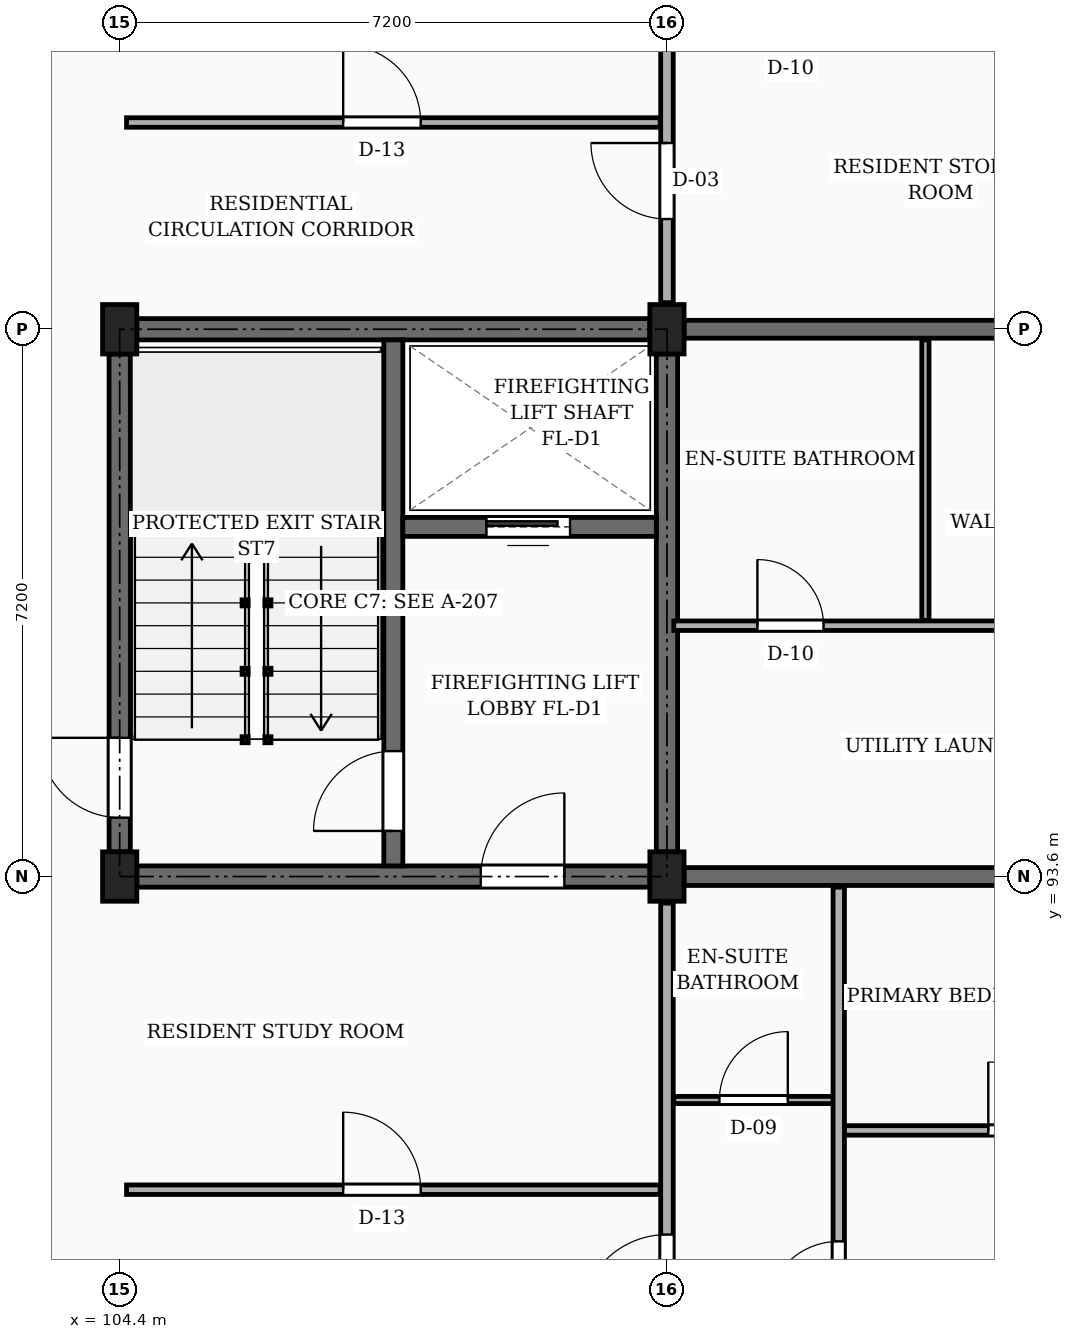
"""IFC4 building model, lengths in metres.
Left out: names, types, materials, properties, quantities, classifications, styles, units other than length and angle.
Written with IfcOpenShell. Run it as: python <this file> out.ifc"""

import sys

from ifc_helpers import new_model, si_unit, direction, frame, frame_2d, origin, origin_2d, place, context, subcontext, project, spatial, rectangle, extrude, element, fill, save


model = new_model("IFC4")
c1 = context("Model", 3, precision=1e-05, world=origin(), true_north=direction((0.0, 1.0)))
c2 = subcontext(c1, "Body", "Model", "MODEL_VIEW")
j1 = project(units=[si_unit("LENGTHUNIT", "METRE"), si_unit("PLANEANGLEUNIT", "RADIAN")], contexts=[c1])
p1 = place(None, origin())
s1 = spatial("IfcSite", under=j1, at=p1, CompositionType="ELEMENT")
p2 = place(p1, origin())
s2 = spatial("IfcBuilding", under=s1, at=p2, CompositionType="ELEMENT")
p3 = place(p2, frame((0.0, 0.0, 20.25)))
s3 = spatial("IfcBuildingStorey", under=s2, at=p3, CompositionType="ELEMENT", Elevation=20.25)
for number, where, z_axis, x_axis in (
    (1, (104.4, 93.6, 0.0), (0.0, 0.0, 1.0), (1.0, 0.0, 0.0)),
    (2, (104.4, 100.8, 0.0), (0.0, 0.0, 1.0), (1.0, 0.0, 0.0)),
    (3, (111.6, 93.6, 0.0), (0.0, 0.0, 1.0), (1.0, 0.0, 0.0)),
    (4, (111.6, 100.8, 0.0), (0.0, 0.0, 1.0), (1.0, 0.0, 0.0)),
):
    element("IfcColumn", number, at=place(p3, frame(where, z_axis=z_axis, x_axis=x_axis)), inside=s3, PredefinedType="COLUMN", context=c2, shape_type="SweptSolid", body=[
        extrude(rectangle(XDim=0.45, YDim=0.65, at=origin_2d()), origin(), (0.0, 0.0, 1.0), 3.15),
    ])
p4 = place(p3, frame((111.825, 93.6, 0.0), z_axis=(0.0, 0.0, 1.0), x_axis=(1.0, 0.0, 0.0)))
e5 = element("IfcWall", 5, at=p4, inside=s3, PredefinedType="SOLIDWALL", context=c2, shape_type="SweptSolid", body=[
    extrude(rectangle(XDim=6.7, YDim=0.235, at=frame_2d((3.35, 0.0))), origin(), (0.0, 0.0, 1.0), 2.19),
])
p5 = place(p4, frame((4.35, 0.0, 0.0)))
e6 = element("IfcOpeningElement", 6, at=p5, cuts=e5, PredefinedType="OPENING", context=c2, shape_type="SweptSolid", body=[
    extrude(rectangle(XDim=0.98, YDim=2.12, at=frame_2d((0.49, 1.06))), frame((0.0, 0.127, 0.0), z_axis=(0.0, -1.0, 0.0), x_axis=(1.0, 0.0, 0.0)), (0.0, 0.0, 1.0), 0.255),
])
p6 = place(p3, frame((111.825, 100.8, 0.0), z_axis=(0.0, 0.0, 1.0), x_axis=(1.0, 0.0, 0.0)))
e7 = element("IfcWall", 7, at=p6, inside=s3, PredefinedType="SOLIDWALL", context=c2, shape_type="SweptSolid", body=[
    extrude(rectangle(XDim=6.7, YDim=0.235, at=frame_2d((3.35, 0.0))), origin(), (0.0, 0.0, 1.0), 2.19),
])
p7 = place(p3, frame((104.4, 93.925, 0.0), z_axis=(0.0, 0.0, 1.0), x_axis=(0.0, 1.0, 0.0)))
e8 = element("IfcWall", 8, at=p7, inside=s3, PredefinedType="SHEAR", context=c2, shape_type="SweptSolid", body=[
    extrude(rectangle(XDim=6.55, YDim=0.28, at=frame_2d((3.275, 0.0))), origin(), (0.0, 0.0, 1.0), 2.89),
])
p8 = place(p7, frame((0.45, 0.0, 0.0)))
e9 = element("IfcOpeningElement", 9, at=p8, cuts=e8, PredefinedType="OPENING", context=c2, shape_type="SweptSolid", body=[
    extrude(rectangle(XDim=1.05, YDim=2.15, at=frame_2d((0.525, 1.075))), frame((0.0, 0.15, 0.0), z_axis=(0.0, -1.0, 0.0), x_axis=(1.0, 0.0, 0.0)), (0.0, 0.0, 1.0), 0.3),
])
p9 = place(p3, frame((104.625, 100.8, 0.0), z_axis=(0.0, 0.0, 1.0), x_axis=(1.0, 0.0, 0.0)))
e10 = element("IfcWall", 10, at=p9, inside=s3, PredefinedType="SHEAR", context=c2, shape_type="SweptSolid", body=[
    extrude(rectangle(XDim=6.75, YDim=0.28, at=frame_2d((3.375, 0.0))), origin(), (0.0, 0.0, 1.0), 2.89),
])
p10 = place(p3, frame((111.6, 93.925, 0.0), z_axis=(0.0, 0.0, 1.0), x_axis=(0.0, 1.0, 0.0)))
e11 = element("IfcWall", 11, at=p10, inside=s3, PredefinedType="SHEAR", context=c2, shape_type="SweptSolid", body=[
    extrude(rectangle(XDim=6.55, YDim=0.28, at=frame_2d((3.275, 0.0))), origin(), (0.0, 0.0, 1.0), 2.89),
])
p11 = place(p3, frame((104.625, 93.6, 0.0), z_axis=(0.0, 0.0, 1.0), x_axis=(1.0, 0.0, 0.0)))
e12 = element("IfcWall", 12, at=p11, inside=s3, PredefinedType="SHEAR", context=c2, shape_type="SweptSolid", body=[
    extrude(rectangle(XDim=6.75, YDim=0.28, at=frame_2d((3.375, 0.0))), origin(), (0.0, 0.0, 1.0), 2.89),
])
p12 = place(p11, frame((4.525, 0.0, 0.0)))
e13 = element("IfcOpeningElement", 13, at=p12, cuts=e12, PredefinedType="OPENING", context=c2, shape_type="SweptSolid", body=[
    extrude(rectangle(XDim=1.1, YDim=2.15, at=frame_2d((0.55, 1.075))), frame((0.0, 0.15, 0.0), z_axis=(0.0, -1.0, 0.0), x_axis=(1.0, 0.0, 0.0)), (0.0, 0.0, 1.0), 0.3),
])
p13 = place(p3, frame((108.0, 93.74, 0.0), z_axis=(0.0, 0.0, 1.0), x_axis=(0.0, 1.0, 0.0)))
e14 = element("IfcWall", 14, at=p13, inside=s3, PredefinedType="SHEAR", context=c2, shape_type="SweptSolid", body=[
    extrude(rectangle(XDim=6.92, YDim=0.25, at=frame_2d((3.46, 0.0))), origin(), (0.0, 0.0, 1.0), 2.89),
])
p14 = place(p13, frame((0.46, 0.0, 0.0)))
e15 = element("IfcOpeningElement", 15, at=p14, cuts=e14, PredefinedType="OPENING", context=c2, shape_type="SweptSolid", body=[
    extrude(rectangle(XDim=1.05, YDim=2.15, at=frame_2d((0.525, 1.075))), frame((0.0, 0.135, 0.0), z_axis=(0.0, -1.0, 0.0), x_axis=(1.0, 0.0, 0.0)), (0.0, 0.0, 1.0), 0.27),
])
p15 = place(p3, frame((108.125, 98.2, 0.0), z_axis=(0.0, 0.0, 1.0), x_axis=(1.0, 0.0, 0.0)))
e16 = element("IfcWall", 16, at=p15, inside=s3, PredefinedType="SHEAR", context=c2, shape_type="SweptSolid", body=[
    extrude(rectangle(XDim=3.335, YDim=0.25, at=frame_2d((1.667, 0.0))), origin(), (0.0, 0.0, 1.0), 2.89),
])
p16 = place(p15, frame((1.1, 0.0, 0.0)))
e17 = element("IfcOpeningElement", 17, at=p16, cuts=e16, PredefinedType="OPENING", context=c2, shape_type="SweptSolid", body=[
    extrude(rectangle(XDim=1.1, YDim=2.2, at=frame_2d((0.55, 1.1))), frame((0.0, 0.135, 0.0), z_axis=(0.0, -1.0, 0.0), x_axis=(1.0, 0.0, 0.0)), (0.0, 0.0, 1.0), 0.27),
])
p17 = place(p3, frame((111.6, 86.75, 0.0), z_axis=(0.0, 0.0, 1.0), x_axis=(0.0, 1.0, 0.0)))
e18 = element("IfcWall", 18, at=p17, inside=s3, PredefinedType="PARTITIONING", context=c2, shape_type="SweptSolid", body=[
    extrude(rectangle(XDim=6.5, YDim=0.165, at=frame_2d((3.25, 0.0))), origin(), (0.0, 0.0, 1.0), 2.325),
])
p18 = place(p17, frame((1.0, 0.0, 0.0)))
e19 = element("IfcOpeningElement", 19, at=p18, cuts=e18, PredefinedType="OPENING", context=c2, shape_type="SweptSolid", body=[
    extrude(rectangle(XDim=1.14, YDim=2.18, at=frame_2d((0.57, 1.09))), frame((0.0, 0.093, 0.0), z_axis=(0.0, -1.0, 0.0), x_axis=(1.0, 0.0, 0.0)), (0.0, 0.0, 1.0), 0.185),
])
p19 = place(p3, frame((111.6, 101.15, 0.0), z_axis=(0.0, 0.0, 1.0), x_axis=(0.0, 1.0, 0.0)))
e20 = element("IfcWall", 20, at=p19, inside=s3, PredefinedType="PARTITIONING", context=c2, shape_type="SweptSolid", body=[
    extrude(rectangle(XDim=6.5, YDim=0.165, at=frame_2d((3.25, 0.0))), origin(), (0.0, 0.0, 1.0), 2.325),
])
p20 = place(p19, frame((1.1, 0.0, 0.0)))
e21 = element("IfcOpeningElement", 21, at=p20, cuts=e20, PredefinedType="OPENING", context=c2, shape_type="SweptSolid", body=[
    extrude(rectangle(XDim=1.0, YDim=2.15, at=frame_2d((0.5, 1.075))), frame((0.0, 0.093, 0.0), z_axis=(0.0, -1.0, 0.0), x_axis=(1.0, 0.0, 0.0)), (0.0, 0.0, 1.0), 0.185),
])
p21 = place(p3, frame((104.49, 89.48, 0.0), z_axis=(0.0, 0.0, 1.0), x_axis=(1.0, 0.0, 0.0)))
e22 = element("IfcWall", 22, at=p21, inside=s3, PredefinedType="PARTITIONING", context=c2, shape_type="SweptSolid", body=[
    extrude(rectangle(XDim=7.02, YDim=0.125, at=frame_2d((3.51, 0.0))), origin(), (0.0, 0.0, 1.0), 2.325),
])
p22 = place(p21, frame((2.85, 0.0, 0.0)))
e23 = element("IfcOpeningElement", 23, at=p22, cuts=e22, PredefinedType="OPENING", context=c2, shape_type="SweptSolid", body=[
    extrude(rectangle(XDim=1.02, YDim=2.15, at=frame_2d((0.51, 1.075))), frame((0.0, 0.073, 0.0), z_axis=(0.0, -1.0, 0.0), x_axis=(1.0, 0.0, 0.0)), (0.0, 0.0, 1.0), 0.145),
])
p23 = place(p3, frame((113.93, 90.26, 0.0), z_axis=(0.0, 0.0, 1.0), x_axis=(1.0, 0.0, 0.0)))
e24 = element("IfcWall", 24, at=p23, inside=s3, PredefinedType="PARTITIONING", context=c2, shape_type="SweptSolid", body=[
    extrude(rectangle(XDim=4.695, YDim=0.125, at=frame_2d((2.348, 0.0))), origin(), (0.0, 0.0, 1.0), 2.325),
])
p24 = place(p23, frame((1.897, 0.0, 0.0)))
e25 = element("IfcOpeningElement", 25, at=p24, cuts=e24, PredefinedType="OPENING", context=c2, shape_type="SweptSolid", body=[
    extrude(rectangle(XDim=0.9, YDim=2.1, at=frame_2d((0.45, 1.05))), frame((0.0, 0.073, 0.0), z_axis=(0.0, -1.0, 0.0), x_axis=(1.0, 0.0, 0.0)), (0.0, 0.0, 1.0), 0.145),
])
p25 = place(p3, frame((111.69, 90.66, 0.0), z_axis=(0.0, 0.0, 1.0), x_axis=(1.0, 0.0, 0.0)))
e26 = element("IfcWall", 26, at=p25, inside=s3, PredefinedType="PARTITIONING", context=c2, shape_type="SweptSolid", body=[
    extrude(rectangle(XDim=2.1, YDim=0.095, at=frame_2d((1.05, 0.0))), origin(), (0.0, 0.0, 1.0), 2.325),
])
p26 = place(p25, frame((0.6, 0.0, 0.0)))
e27 = element("IfcOpeningElement", 27, at=p26, cuts=e26, PredefinedType="OPENING", context=c2, shape_type="SweptSolid", body=[
    extrude(rectangle(XDim=0.9, YDim=2.05, at=frame_2d((0.45, 1.025))), frame((0.0, 0.058, 0.0), z_axis=(0.0, -1.0, 0.0), x_axis=(1.0, 0.0, 0.0)), (0.0, 0.0, 1.0), 0.115),
])
p27 = place(p3, frame((113.86, 86.575, 0.0), z_axis=(0.0, 0.0, 1.0), x_axis=(0.0, 1.0, 0.0)))
e28 = element("IfcWall", 28, at=p27, inside=s3, PredefinedType="PARTITIONING", context=c2, shape_type="SweptSolid", body=[
    extrude(rectangle(XDim=6.885, YDim=0.15, at=frame_2d((3.442, 0.0))), origin(), (0.0, 0.0, 1.0), 2.325),
])
p28 = place(p27, frame((1.275, 0.0, 0.0)))
e29 = element("IfcOpeningElement", 29, at=p28, cuts=e28, PredefinedType="OPENING", context=c2, shape_type="SweptSolid", body=[
    extrude(rectangle(XDim=0.95, YDim=2.1, at=frame_2d((0.475, 1.05))), frame((0.0, 0.085, 0.0), z_axis=(0.0, -1.0, 0.0), x_axis=(1.0, 0.0, 0.0)), (0.0, 0.0, 1.0), 0.17),
])
p29 = place(p3, frame((111.69, 96.9, 0.0), z_axis=(0.0, 0.0, 1.0), x_axis=(1.0, 0.0, 0.0)))
e30 = element("IfcWall", 30, at=p29, inside=s3, PredefinedType="PARTITIONING", context=c2, shape_type="SweptSolid", body=[
    extrude(rectangle(XDim=6.935, YDim=0.125, at=frame_2d((3.468, 0.0))), origin(), (0.0, 0.0, 1.0), 2.325),
])
p30 = place(p29, frame((1.1, 0.0, 0.0)))
e31 = element("IfcOpeningElement", 31, at=p30, cuts=e30, PredefinedType="OPENING", context=c2, shape_type="SweptSolid", body=[
    extrude(rectangle(XDim=0.87, YDim=2.05, at=frame_2d((0.435, 1.025))), frame((0.0, 0.073, 0.0), z_axis=(0.0, -1.0, 0.0), x_axis=(1.0, 0.0, 0.0)), (0.0, 0.0, 1.0), 0.145),
])
p31 = place(p29, frame((4.5, 0.0, 0.0)))
e32 = element("IfcOpeningElement", 32, at=p31, cuts=e30, PredefinedType="OPENING", context=c2, shape_type="SweptSolid", body=[
    extrude(rectangle(XDim=0.88, YDim=2.08, at=frame_2d((0.44, 1.04))), frame((0.0, 0.073, 0.0), z_axis=(0.0, -1.0, 0.0), x_axis=(1.0, 0.0, 0.0)), (0.0, 0.0, 1.0), 0.145),
])
p32 = place(p3, frame((115.0, 96.97, 0.0), z_axis=(0.0, 0.0, 1.0), x_axis=(0.0, 1.0, 0.0)))
e33 = element("IfcWall", 33, at=p32, inside=s3, PredefinedType="PARTITIONING", context=c2, shape_type="SweptSolid", body=[
    extrude(rectangle(XDim=3.69, YDim=0.095, at=frame_2d((1.845, 0.0))), origin(), (0.0, 0.0, 1.0), 2.325),
])
p33 = place(p3, frame((104.49, 103.52, 0.0), z_axis=(0.0, 0.0, 1.0), x_axis=(1.0, 0.0, 0.0)))
e34 = element("IfcWall", 34, at=p33, inside=s3, PredefinedType="PARTITIONING", context=c2, shape_type="SweptSolid", body=[
    extrude(rectangle(XDim=7.02, YDim=0.125, at=frame_2d((3.51, 0.0))), origin(), (0.0, 0.0, 1.0), 2.325),
])
p34 = place(p33, frame((2.85, 0.0, 0.0)))
e35 = element("IfcOpeningElement", 35, at=p34, cuts=e34, PredefinedType="OPENING", context=c2, shape_type="SweptSolid", body=[
    extrude(rectangle(XDim=1.02, YDim=2.15, at=frame_2d((0.51, 1.075))), frame((0.0, 0.073, 0.0), z_axis=(0.0, -1.0, 0.0), x_axis=(1.0, 0.0, 0.0)), (0.0, 0.0, 1.0), 0.145),
])
p35 = place(p8, origin())
e36 = element("IfcDoor", 36, at=p35, inside=s3, OperationType="SINGLE_SWING_RIGHT", PredefinedType="DOOR", context=c2, shape_type="SweptSolid", body=[
    extrude(rectangle(XDim=1.05, YDim=2.15, at=frame_2d((0.525, 1.075))), frame((0.0, 0.025, 0.0), z_axis=(0.0, -1.0, 0.0), x_axis=(1.0, 0.0, 0.0)), (0.0, 0.0, 1.0), 0.05),
])
fill(e9, e36)
p36 = place(p12, frame((1.1, 0.0, 0.0), z_axis=(0.0, 0.0, 1.0), x_axis=(-1.0, 0.0, 0.0)))
e37 = element("IfcDoor", 37, at=p36, inside=s3, OperationType="SINGLE_SWING_RIGHT", PredefinedType="DOOR", context=c2, shape_type="SweptSolid", body=[
    extrude(rectangle(XDim=1.1, YDim=2.15, at=frame_2d((0.55, 1.075))), frame((0.0, 0.025, 0.0), z_axis=(0.0, -1.0, 0.0), x_axis=(1.0, 0.0, 0.0)), (0.0, 0.0, 1.0), 0.05),
])
fill(e13, e37)
p37 = place(p14, origin())
e38 = element("IfcDoor", 38, at=p37, inside=s3, OperationType="SINGLE_SWING_LEFT", PredefinedType="DOOR", context=c2, shape_type="SweptSolid", body=[
    extrude(rectangle(XDim=1.05, YDim=2.15, at=frame_2d((0.525, 1.075))), frame((0.0, 0.025, 0.0), z_axis=(0.0, -1.0, 0.0), x_axis=(1.0, 0.0, 0.0)), (0.0, 0.0, 1.0), 0.05),
])
fill(e15, e38)
p38 = place(p16, origin())
e39 = element("IfcDoor", 39, at=p38, inside=s3, OperationType="SLIDING_TO_LEFT", PredefinedType="DOOR", context=c2, shape_type="SweptSolid", body=[
    extrude(rectangle(XDim=1.1, YDim=2.2, at=frame_2d((0.55, 1.1))), frame((0.0, 0.025, 0.0), z_axis=(0.0, -1.0, 0.0), x_axis=(1.0, 0.0, 0.0)), (0.0, 0.0, 1.0), 0.05),
])
fill(e17, e39)
p39 = place(p18, origin())
e40 = element("IfcDoor", 40, at=p39, inside=s3, OperationType="SINGLE_SWING_LEFT", PredefinedType="DOOR", context=c2, shape_type="SweptSolid", body=[
    extrude(rectangle(XDim=1.14, YDim=2.18, at=frame_2d((0.57, 1.09))), frame((0.0, 0.025, 0.0), z_axis=(0.0, -1.0, 0.0), x_axis=(1.0, 0.0, 0.0)), (0.0, 0.0, 1.0), 0.05),
])
fill(e19, e40)
p40 = place(p20, origin())
e41 = element("IfcDoor", 41, at=p40, inside=s3, OperationType="SINGLE_SWING_RIGHT", PredefinedType="DOOR", context=c2, shape_type="SweptSolid", body=[
    extrude(rectangle(XDim=1.0, YDim=2.15, at=frame_2d((0.5, 1.075))), frame((0.0, 0.025, 0.0), z_axis=(0.0, -1.0, 0.0), x_axis=(1.0, 0.0, 0.0)), (0.0, 0.0, 1.0), 0.05),
])
fill(e21, e41)
p41 = place(p22, origin())
e42 = element("IfcDoor", 42, at=p41, inside=s3, OperationType="SINGLE_SWING_LEFT", PredefinedType="DOOR", context=c2, shape_type="SweptSolid", body=[
    extrude(rectangle(XDim=1.02, YDim=2.15, at=frame_2d((0.51, 1.075))), frame((0.0, 0.025, 0.0), z_axis=(0.0, -1.0, 0.0), x_axis=(1.0, 0.0, 0.0)), (0.0, 0.0, 1.0), 0.05),
])
fill(e23, e42)
p42 = place(p24, origin())
e43 = element("IfcDoor", 43, at=p42, inside=s3, OperationType="SINGLE_SWING_LEFT", PredefinedType="DOOR", context=c2, shape_type="SweptSolid", body=[
    extrude(rectangle(XDim=0.9, YDim=2.1, at=frame_2d((0.45, 1.05))), frame((0.0, 0.025, 0.0), z_axis=(0.0, -1.0, 0.0), x_axis=(1.0, 0.0, 0.0)), (0.0, 0.0, 1.0), 0.05),
])
fill(e25, e43)
p43 = place(p26, origin())
e44 = element("IfcDoor", 44, at=p43, inside=s3, OperationType="SINGLE_SWING_RIGHT", PredefinedType="DOOR", context=c2, shape_type="SweptSolid", body=[
    extrude(rectangle(XDim=0.9, YDim=2.05, at=frame_2d((0.45, 1.025))), frame((0.0, 0.025, 0.0), z_axis=(0.0, -1.0, 0.0), x_axis=(1.0, 0.0, 0.0)), (0.0, 0.0, 1.0), 0.05),
])
fill(e27, e44)
p44 = place(p28, origin())
e45 = element("IfcDoor", 45, at=p44, inside=s3, OperationType="SINGLE_SWING_LEFT", PredefinedType="DOOR", context=c2, shape_type="SweptSolid", body=[
    extrude(rectangle(XDim=0.95, YDim=2.1, at=frame_2d((0.475, 1.05))), frame((0.0, 0.025, 0.0), z_axis=(0.0, -1.0, 0.0), x_axis=(1.0, 0.0, 0.0)), (0.0, 0.0, 1.0), 0.05),
])
fill(e29, e45)
p45 = place(p30, origin())
e46 = element("IfcDoor", 46, at=p45, inside=s3, OperationType="SINGLE_SWING_LEFT", PredefinedType="DOOR", context=c2, shape_type="SweptSolid", body=[
    extrude(rectangle(XDim=0.87, YDim=2.05, at=frame_2d((0.435, 1.025))), frame((0.0, 0.025, 0.0), z_axis=(0.0, -1.0, 0.0), x_axis=(1.0, 0.0, 0.0)), (0.0, 0.0, 1.0), 0.05),
])
fill(e31, e46)
p46 = place(p34, origin())
e47 = element("IfcDoor", 47, at=p46, inside=s3, OperationType="SINGLE_SWING_LEFT", PredefinedType="DOOR", context=c2, shape_type="SweptSolid", body=[
    extrude(rectangle(XDim=1.02, YDim=2.15, at=frame_2d((0.51, 1.075))), frame((0.0, 0.025, 0.0), z_axis=(0.0, -1.0, 0.0), x_axis=(1.0, 0.0, 0.0)), (0.0, 0.0, 1.0), 0.05),
])
fill(e35, e47)
save(model, sys.argv[1])
